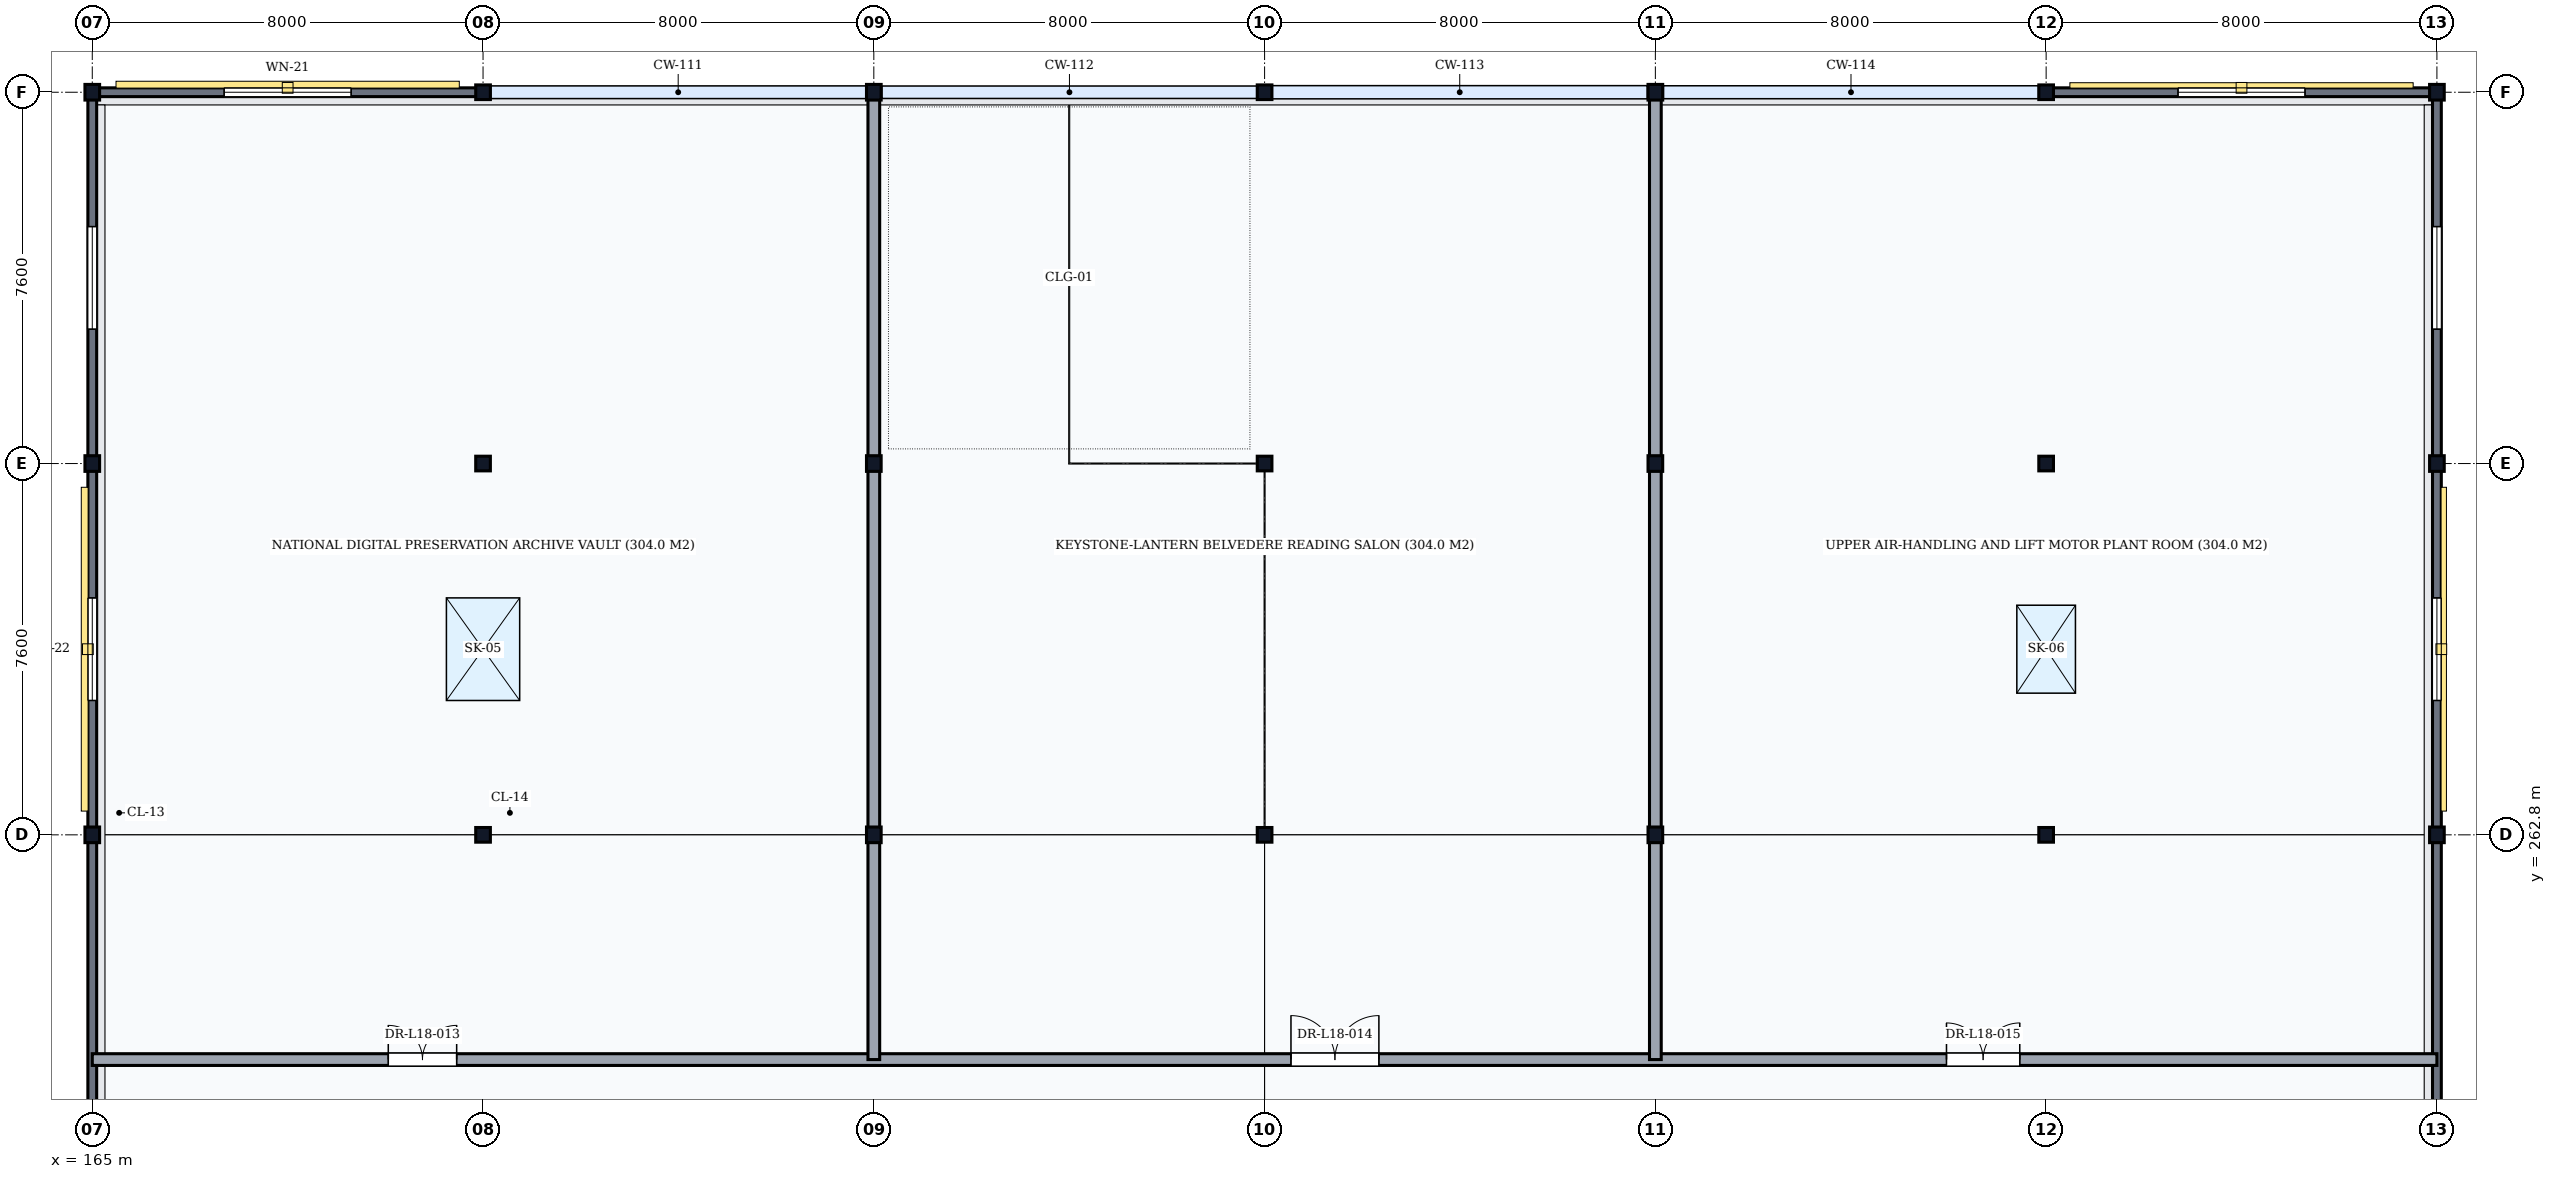
"""IFC4 building model, lengths in metres.
Left out: names, types, materials, properties, quantities, classifications, styles, units other than length and angle.
Written with IfcOpenShell. Run it as: python <this file> out.ifc"""

import sys

from ifc_helpers import new_model, si_unit, direction, frame, frame_2d, origin, origin_2d, place, context, subcontext, project, spatial, rectangle, i_section, extrude, element, fill, save


model = new_model("IFC4")
c1 = context("Model", 3, precision=1e-05, world=origin(), true_north=direction((0.0, 1.0)))
c2 = subcontext(c1, "Body", "Model", "MODEL_VIEW")
j1 = project(units=[si_unit("LENGTHUNIT", "METRE"), si_unit("PLANEANGLEUNIT", "RADIAN")], contexts=[c1])
p1 = place(None, origin())
s1 = spatial("IfcSite", under=j1, at=p1, CompositionType="ELEMENT")
p2 = place(p1, origin())
s2 = spatial("IfcBuilding", under=s1, at=p2, CompositionType="ELEMENT")
p3 = place(p2, frame((0.0, 0.0, 72.3)))
s3 = spatial("IfcBuildingStorey", under=s2, at=p3, CompositionType="ELEMENT", Elevation=72.3)
for number, where, z_axis, x_axis in (
    (1, (165.0, 262.8, 0.0), (0.0, 0.0, 1.0), (1.0, 0.0, 0.0)),
    (2, (165.0, 270.4, 0.0), (0.0, 0.0, 1.0), (1.0, 0.0, 0.0)),
    (3, (165.0, 278.0, 0.0), (0.0, 0.0, 1.0), (1.0, 0.0, 0.0)),
):
    element("IfcColumn", number, at=place(p3, frame(where, z_axis=z_axis, x_axis=x_axis)), inside=s3, PredefinedType="COLUMN", context=c2, shape_type="SweptSolid", body=[
        extrude(i_section(OverallWidth=0.3, OverallDepth=0.32, WebThickness=0.011, FlangeThickness=0.021, FilletRadius=0.027, at=origin_2d()), origin(), (0.0, 0.0, 1.0), 5.4),
    ])
for number, where, z_axis, x_axis in (
    (4, (173.0, 262.8, 0.0), (0.0, 0.0, 1.0), (1.0, 0.0, 0.0)),
    (5, (173.0, 270.4, 0.0), (0.0, 0.0, 1.0), (1.0, 0.0, 0.0)),
    (6, (173.0, 278.0, 0.0), (0.0, 0.0, 1.0), (1.0, 0.0, 0.0)),
):
    element("IfcColumn", number, at=place(p3, frame(where, z_axis=z_axis, x_axis=x_axis)), inside=s3, PredefinedType="COLUMN", context=c2, shape_type="SweptSolid", body=[
        extrude(i_section(OverallWidth=0.3, OverallDepth=0.3, WebThickness=0.011, FlangeThickness=0.019, FilletRadius=0.027, at=origin_2d()), origin(), (0.0, 0.0, 1.0), 5.4),
    ])
for number, where, z_axis, x_axis in (
    (7, (181.0, 262.8, 0.0), (0.0, 0.0, 1.0), (1.0, 0.0, 0.0)),
    (8, (181.0, 270.4, 0.0), (0.0, 0.0, 1.0), (1.0, 0.0, 0.0)),
    (9, (181.0, 278.0, 0.0), (0.0, 0.0, 1.0), (1.0, 0.0, 0.0)),
):
    element("IfcColumn", number, at=place(p3, frame(where, z_axis=z_axis, x_axis=x_axis)), inside=s3, PredefinedType="COLUMN", context=c2, shape_type="SweptSolid", body=[
        extrude(i_section(OverallWidth=0.3, OverallDepth=0.32, WebThickness=0.011, FlangeThickness=0.021, FilletRadius=0.027, at=origin_2d()), origin(), (0.0, 0.0, 1.0), 5.4),
    ])
for number, where, z_axis, x_axis in (
    (10, (189.0, 262.8, 0.0), (0.0, 0.0, 1.0), (1.0, 0.0, 0.0)),
    (11, (189.0, 270.4, 0.0), (0.0, 0.0, 1.0), (1.0, 0.0, 0.0)),
    (12, (189.0, 278.0, 0.0), (0.0, 0.0, 1.0), (1.0, 0.0, 0.0)),
):
    element("IfcColumn", number, at=place(p3, frame(where, z_axis=z_axis, x_axis=x_axis)), inside=s3, PredefinedType="COLUMN", context=c2, shape_type="SweptSolid", body=[
        extrude(i_section(OverallWidth=0.3, OverallDepth=0.3, WebThickness=0.011, FlangeThickness=0.019, FilletRadius=0.027, at=origin_2d()), origin(), (0.0, 0.0, 1.0), 5.4),
    ])
for number, where, z_axis, x_axis in (
    (13, (197.0, 262.8, 0.0), (0.0, 0.0, 1.0), (1.0, 0.0, 0.0)),
    (14, (197.0, 270.4, 0.0), (0.0, 0.0, 1.0), (1.0, 0.0, 0.0)),
    (15, (197.0, 278.0, 0.0), (0.0, 0.0, 1.0), (1.0, 0.0, 0.0)),
):
    element("IfcColumn", number, at=place(p3, frame(where, z_axis=z_axis, x_axis=x_axis)), inside=s3, PredefinedType="COLUMN", context=c2, shape_type="SweptSolid", body=[
        extrude(i_section(OverallWidth=0.3, OverallDepth=0.32, WebThickness=0.011, FlangeThickness=0.021, FilletRadius=0.027, at=origin_2d()), origin(), (0.0, 0.0, 1.0), 5.4),
    ])
for number, where, z_axis, x_axis in (
    (16, (205.0, 262.8, 0.0), (0.0, 0.0, 1.0), (1.0, 0.0, 0.0)),
    (17, (205.0, 270.4, 0.0), (0.0, 0.0, 1.0), (1.0, 0.0, 0.0)),
    (18, (205.0, 278.0, 0.0), (0.0, 0.0, 1.0), (1.0, 0.0, 0.0)),
):
    element("IfcColumn", number, at=place(p3, frame(where, z_axis=z_axis, x_axis=x_axis)), inside=s3, PredefinedType="COLUMN", context=c2, shape_type="SweptSolid", body=[
        extrude(i_section(OverallWidth=0.3, OverallDepth=0.3, WebThickness=0.011, FlangeThickness=0.019, FilletRadius=0.027, at=origin_2d()), origin(), (0.0, 0.0, 1.0), 5.4),
    ])
for number, where, z_axis, x_axis in (
    (19, (213.0, 262.8, 0.0), (0.0, 0.0, 1.0), (1.0, 0.0, 0.0)),
    (20, (213.0, 270.4, 0.0), (0.0, 0.0, 1.0), (1.0, 0.0, 0.0)),
    (21, (213.0, 278.0, 0.0), (0.0, 0.0, 1.0), (1.0, 0.0, 0.0)),
):
    element("IfcColumn", number, at=place(p3, frame(where, z_axis=z_axis, x_axis=x_axis)), inside=s3, PredefinedType="COLUMN", context=c2, shape_type="SweptSolid", body=[
        extrude(i_section(OverallWidth=0.3, OverallDepth=0.32, WebThickness=0.011, FlangeThickness=0.021, FilletRadius=0.027, at=origin_2d()), origin(), (0.0, 0.0, 1.0), 5.4),
    ])
p4 = place(p3, frame((165.006, 278.0, 0.0), z_axis=(0.0, 0.0, 1.0), x_axis=(1.0, 0.0, 0.0)))
e22 = element("IfcWall", 22, at=p4, inside=s3, PredefinedType="SOLIDWALL", context=c2, shape_type="SweptSolid", body=[
    extrude(rectangle(XDim=7.988, YDim=0.18, at=frame_2d((3.994, 0.0))), origin(), (0.0, 0.0, 1.0), 4.838),
])
p5 = place(p4, frame((2.694, 0.0, 0.95)))
e23 = element("IfcOpeningElement", 23, at=p5, cuts=e22, PredefinedType="OPENING", context=c2, shape_type="SweptSolid", body=[
    extrude(rectangle(XDim=2.6, YDim=2.4, at=frame_2d((1.3, 1.2))), frame((0.0, 0.105, 0.0), z_axis=(0.0, -1.0, 0.0), x_axis=(1.0, 0.0, 0.0)), (0.0, 0.0, 1.0), 0.21),
])
p6 = place(p3, frame((205.006, 278.0, 0.0), z_axis=(0.0, 0.0, 1.0), x_axis=(1.0, 0.0, 0.0)))
e24 = element("IfcWall", 24, at=p6, inside=s3, PredefinedType="SOLIDWALL", context=c2, shape_type="SweptSolid", body=[
    extrude(rectangle(XDim=7.988, YDim=0.18, at=frame_2d((3.994, 0.0))), origin(), (0.0, 0.0, 1.0), 4.838),
])
p7 = place(p6, frame((2.694, 0.0, 0.95)))
e25 = element("IfcOpeningElement", 25, at=p7, cuts=e24, PredefinedType="OPENING", context=c2, shape_type="SweptSolid", body=[
    extrude(rectangle(XDim=2.6, YDim=2.4, at=frame_2d((1.3, 1.2))), frame((0.0, 0.105, 0.0), z_axis=(0.0, -1.0, 0.0), x_axis=(1.0, 0.0, 0.0)), (0.0, 0.0, 1.0), 0.21),
])
p8 = place(p3, frame((165.0, 255.206, 0.0), z_axis=(0.0, 0.0, 1.0), x_axis=(0.0, 1.0, 0.0)))
e26 = element("IfcWall", 26, at=p8, inside=s3, PredefinedType="SOLIDWALL", context=c2, shape_type="SweptSolid", body=[
    extrude(rectangle(XDim=7.588, YDim=0.18, at=frame_2d((3.794, 0.0))), origin(), (0.0, 0.0, 1.0), 4.878),
])
p9 = place(p3, frame((165.0, 262.806, 0.0), z_axis=(0.0, 0.0, 1.0), x_axis=(0.0, 1.0, 0.0)))
e27 = element("IfcWall", 27, at=p9, inside=s3, PredefinedType="SOLIDWALL", context=c2, shape_type="SweptSolid", body=[
    extrude(rectangle(XDim=7.588, YDim=0.18, at=frame_2d((3.794, 0.0))), origin(), (0.0, 0.0, 1.0), 4.878),
])
p10 = place(p9, frame((2.744, 0.0, 0.95)))
e28 = element("IfcOpeningElement", 28, at=p10, cuts=e27, PredefinedType="OPENING", context=c2, shape_type="SweptSolid", body=[
    extrude(rectangle(XDim=2.1, YDim=2.3, at=frame_2d((1.05, 1.15))), frame((0.0, 0.105, 0.0), z_axis=(0.0, -1.0, 0.0), x_axis=(1.0, 0.0, 0.0)), (0.0, 0.0, 1.0), 0.21),
])
p11 = place(p3, frame((165.0, 270.406, 0.0), z_axis=(0.0, 0.0, 1.0), x_axis=(0.0, 1.0, 0.0)))
e29 = element("IfcWall", 29, at=p11, inside=s3, PredefinedType="SOLIDWALL", context=c2, shape_type="SweptSolid", body=[
    extrude(rectangle(XDim=7.588, YDim=0.18, at=frame_2d((3.794, 0.0))), origin(), (0.0, 0.0, 1.0), 4.878),
])
p12 = place(p11, frame((2.744, 0.0, 0.95)))
e30 = element("IfcOpeningElement", 30, at=p12, cuts=e29, PredefinedType="OPENING", context=c2, shape_type="SweptSolid", body=[
    extrude(rectangle(XDim=2.1, YDim=2.3, at=frame_2d((1.05, 1.15))), frame((0.0, 0.105, 0.0), z_axis=(0.0, -1.0, 0.0), x_axis=(1.0, 0.0, 0.0)), (0.0, 0.0, 1.0), 0.21),
])
p13 = place(p3, frame((213.0, 255.206, 0.0), z_axis=(0.0, 0.0, 1.0), x_axis=(0.0, 1.0, 0.0)))
e31 = element("IfcWall", 31, at=p13, inside=s3, PredefinedType="SOLIDWALL", context=c2, shape_type="SweptSolid", body=[
    extrude(rectangle(XDim=7.588, YDim=0.18, at=frame_2d((3.794, 0.0))), origin(), (0.0, 0.0, 1.0), 4.878),
])
p14 = place(p3, frame((213.0, 262.806, 0.0), z_axis=(0.0, 0.0, 1.0), x_axis=(0.0, 1.0, 0.0)))
e32 = element("IfcWall", 32, at=p14, inside=s3, PredefinedType="SOLIDWALL", context=c2, shape_type="SweptSolid", body=[
    extrude(rectangle(XDim=7.588, YDim=0.18, at=frame_2d((3.794, 0.0))), origin(), (0.0, 0.0, 1.0), 4.878),
])
p15 = place(p14, frame((2.744, 0.0, 0.95)))
e33 = element("IfcOpeningElement", 33, at=p15, cuts=e32, PredefinedType="OPENING", context=c2, shape_type="SweptSolid", body=[
    extrude(rectangle(XDim=2.1, YDim=2.3, at=frame_2d((1.05, 1.15))), frame((0.0, 0.105, 0.0), z_axis=(0.0, -1.0, 0.0), x_axis=(1.0, 0.0, 0.0)), (0.0, 0.0, 1.0), 0.21),
])
p16 = place(p3, frame((213.0, 270.406, 0.0), z_axis=(0.0, 0.0, 1.0), x_axis=(0.0, 1.0, 0.0)))
e34 = element("IfcWall", 34, at=p16, inside=s3, PredefinedType="SOLIDWALL", context=c2, shape_type="SweptSolid", body=[
    extrude(rectangle(XDim=7.588, YDim=0.18, at=frame_2d((3.794, 0.0))), origin(), (0.0, 0.0, 1.0), 4.878),
])
p17 = place(p16, frame((2.744, 0.0, 0.95)))
e35 = element("IfcOpeningElement", 35, at=p17, cuts=e34, PredefinedType="OPENING", context=c2, shape_type="SweptSolid", body=[
    extrude(rectangle(XDim=2.1, YDim=2.3, at=frame_2d((1.05, 1.15))), frame((0.0, 0.105, 0.0), z_axis=(0.0, -1.0, 0.0), x_axis=(1.0, 0.0, 0.0)), (0.0, 0.0, 1.0), 0.21),
])
p18 = place(p3, frame((165.0, 277.87, 5.4), z_axis=(0.0, 0.0, 1.0), x_axis=(1.0, 0.0, 0.0)))
e36 = element("IfcWall", 36, at=p18, inside=s3, PredefinedType="PARAPET", context=c2, shape_type="SweptSolid", body=[
    extrude(rectangle(XDim=48.0, YDim=0.26, at=frame_2d((24.0, 0.0))), origin(), (0.0, 0.0, 1.0), 1.5),
])
p19 = place(p3, frame((165.13, 253.12, 5.4), z_axis=(0.0, 0.0, 1.0), x_axis=(0.0, 1.0, 0.0)))
e37 = element("IfcWall", 37, at=p19, inside=s3, PredefinedType="PARAPET", context=c2, shape_type="SweptSolid", body=[
    extrude(rectangle(XDim=24.62, YDim=0.26, at=frame_2d((12.31, 0.0))), origin(), (0.0, 0.0, 1.0), 1.5),
])
p20 = place(p3, frame((212.87, 248.66, 5.4), z_axis=(0.0, 0.0, 1.0), x_axis=(0.0, 1.0, 0.0)))
e38 = element("IfcWall", 38, at=p20, inside=s3, PredefinedType="PARAPET", context=c2, shape_type="SweptSolid", body=[
    extrude(rectangle(XDim=29.08, YDim=0.26, at=frame_2d((14.54, 0.0))), origin(), (0.0, 0.0, 1.0), 1.5),
])
p21 = place(p3, frame((165.0, 258.2, 0.0), z_axis=(0.0, 0.0, 1.0), x_axis=(1.0, 0.0, 0.0)))
e39 = element("IfcWall", 39, at=p21, inside=s3, PredefinedType="PARTITIONING", context=c2, shape_type="SweptSolid", body=[
    extrude(rectangle(XDim=48.0, YDim=0.24, at=frame_2d((24.0, 0.0))), origin(), (0.0, 0.0, 1.0), 5.15),
])
p22 = place(p21, frame((6.06, 0.0, 0.0)))
e40 = element("IfcOpeningElement", 40, at=p22, cuts=e39, PredefinedType="OPENING", context=c2, shape_type="SweptSolid", body=[
    extrude(rectangle(XDim=1.4, YDim=2.1, at=frame_2d((0.7, 1.05))), frame((0.0, 0.135, 0.0), z_axis=(0.0, -1.0, 0.0), x_axis=(1.0, 0.0, 0.0)), (0.0, 0.0, 1.0), 0.27),
])
p23 = place(p21, frame((24.54, 0.0, 0.0)))
e41 = element("IfcOpeningElement", 41, at=p23, cuts=e39, PredefinedType="OPENING", context=c2, shape_type="SweptSolid", body=[
    extrude(rectangle(XDim=1.8, YDim=2.4, at=frame_2d((0.9, 1.2))), frame((0.0, 0.135, 0.0), z_axis=(0.0, -1.0, 0.0), x_axis=(1.0, 0.0, 0.0)), (0.0, 0.0, 1.0), 0.27),
])
p24 = place(p21, frame((37.96, 0.0, 0.0)))
e42 = element("IfcOpeningElement", 42, at=p24, cuts=e39, PredefinedType="OPENING", context=c2, shape_type="SweptSolid", body=[
    extrude(rectangle(XDim=1.5, YDim=2.1, at=frame_2d((0.75, 1.05))), frame((0.0, 0.135, 0.0), z_axis=(0.0, -1.0, 0.0), x_axis=(1.0, 0.0, 0.0)), (0.0, 0.0, 1.0), 0.27),
])
for number, where, z_axis, x_axis in (
    (43, (181.0, 258.2, 0.0), (0.0, 0.0, 1.0), (0.0, 1.0, 0.0)),
    (44, (197.0, 258.2, 0.0), (0.0, 0.0, 1.0), (0.0, 1.0, 0.0)),
):
    element("IfcWall", number, at=place(p3, frame(where, z_axis=z_axis, x_axis=x_axis)), inside=s3, PredefinedType="PARTITIONING", context=c2, shape_type="SweptSolid", body=[
        extrude(rectangle(XDim=19.8, YDim=0.24, at=frame_2d((9.9, 0.0))), origin(), (0.0, 0.0, 1.0), 4.748),
    ])
p25 = place(p5, origin())
e45 = element("IfcWindow", 45, at=p25, inside=s3, PartitioningType="TRIPLE_PANEL_VERTICAL", PredefinedType="WINDOW", context=c2, shape_type="SweptSolid", body=[
    extrude(rectangle(XDim=2.6, YDim=2.4, at=frame_2d((1.3, 1.2))), frame((0.0, 0.03, 0.0), z_axis=(0.0, -1.0, 0.0), x_axis=(1.0, 0.0, 0.0)), (0.0, 0.0, 1.0), 0.06),
])
fill(e23, e45)
p26 = place(p7, origin())
e46 = element("IfcWindow", 46, at=p26, inside=s3, PartitioningType="TRIPLE_PANEL_VERTICAL", PredefinedType="WINDOW", context=c2, shape_type="SweptSolid", body=[
    extrude(rectangle(XDim=2.6, YDim=2.4, at=frame_2d((1.3, 1.2))), frame((0.0, 0.03, 0.0), z_axis=(0.0, -1.0, 0.0), x_axis=(1.0, 0.0, 0.0)), (0.0, 0.0, 1.0), 0.06),
])
fill(e25, e46)
p27 = place(p10, origin())
e47 = element("IfcWindow", 47, at=p27, inside=s3, PartitioningType="DOUBLE_PANEL_VERTICAL", PredefinedType="WINDOW", context=c2, shape_type="SweptSolid", body=[
    extrude(rectangle(XDim=2.1, YDim=2.3, at=frame_2d((1.05, 1.15))), frame((0.0, 0.03, 0.0), z_axis=(0.0, -1.0, 0.0), x_axis=(1.0, 0.0, 0.0)), (0.0, 0.0, 1.0), 0.06),
])
fill(e28, e47)
p28 = place(p12, origin())
e48 = element("IfcWindow", 48, at=p28, inside=s3, PartitioningType="DOUBLE_PANEL_VERTICAL", PredefinedType="WINDOW", context=c2, shape_type="SweptSolid", body=[
    extrude(rectangle(XDim=2.1, YDim=2.3, at=frame_2d((1.05, 1.15))), frame((0.0, 0.03, 0.0), z_axis=(0.0, -1.0, 0.0), x_axis=(1.0, 0.0, 0.0)), (0.0, 0.0, 1.0), 0.06),
])
fill(e30, e48)
p29 = place(p15, origin())
e49 = element("IfcWindow", 49, at=p29, inside=s3, PartitioningType="DOUBLE_PANEL_VERTICAL", PredefinedType="WINDOW", context=c2, shape_type="SweptSolid", body=[
    extrude(rectangle(XDim=2.1, YDim=2.3, at=frame_2d((1.05, 1.15))), frame((0.0, 0.03, 0.0), z_axis=(0.0, -1.0, 0.0), x_axis=(1.0, 0.0, 0.0)), (0.0, 0.0, 1.0), 0.06),
])
fill(e33, e49)
p30 = place(p17, origin())
e50 = element("IfcWindow", 50, at=p30, inside=s3, PartitioningType="DOUBLE_PANEL_VERTICAL", PredefinedType="WINDOW", context=c2, shape_type="SweptSolid", body=[
    extrude(rectangle(XDim=2.1, YDim=2.3, at=frame_2d((1.05, 1.15))), frame((0.0, 0.03, 0.0), z_axis=(0.0, -1.0, 0.0), x_axis=(1.0, 0.0, 0.0)), (0.0, 0.0, 1.0), 0.06),
])
fill(e35, e50)
p31 = place(p2, frame((0.0, 0.0, 77.7)))
p32 = place(p31, frame((0.0, 0.0, -0.25)))
p33 = place(p32, frame((173.0, 266.6, -0.01)))
p34 = place(p33, frame((0.0, 0.0, 0.21)))
e51 = element("IfcWindow", 51, at=p34, inside=s3, PartitioningType="SINGLE_PANEL", PredefinedType="SKYLIGHT", context=c2, shape_type="SweptSolid", body=[
    extrude(rectangle(XDim=1.5, YDim=2.1, at=origin_2d()), origin(), (0.0, 0.0, 1.0), 0.05),
])
p35 = place(p32, frame((205.0, 266.6, -0.01)))
p36 = place(p35, frame((0.0, 0.0, 0.21)))
e52 = element("IfcWindow", 52, at=p36, inside=s3, PartitioningType="SINGLE_PANEL", PredefinedType="SKYLIGHT", context=c2, shape_type="SweptSolid", body=[
    extrude(rectangle(XDim=1.2, YDim=1.8, at=origin_2d()), origin(), (0.0, 0.0, 1.0), 0.05),
])
p37 = place(p22, origin())
e53 = element("IfcDoor", 53, at=p37, inside=s3, OperationType="DOUBLE_DOOR_SINGLE_SWING", PredefinedType="DOOR", context=c2, shape_type="SweptSolid", body=[
    extrude(rectangle(XDim=1.4, YDim=2.1, at=frame_2d((0.7, 1.05))), frame((0.0, 0.025, 0.0), z_axis=(0.0, -1.0, 0.0), x_axis=(1.0, 0.0, 0.0)), (0.0, 0.0, 1.0), 0.05),
])
fill(e40, e53)
p38 = place(p23, origin())
e54 = element("IfcDoor", 54, at=p38, inside=s3, OperationType="DOUBLE_DOOR_SINGLE_SWING", PredefinedType="DOOR", context=c2, shape_type="SweptSolid", body=[
    extrude(rectangle(XDim=1.8, YDim=2.4, at=frame_2d((0.9, 1.2))), frame((0.0, 0.025, 0.0), z_axis=(0.0, -1.0, 0.0), x_axis=(1.0, 0.0, 0.0)), (0.0, 0.0, 1.0), 0.05),
])
fill(e41, e54)
p39 = place(p24, origin())
e55 = element("IfcDoor", 55, at=p39, inside=s3, OperationType="DOUBLE_DOOR_SINGLE_SWING", PredefinedType="DOOR", context=c2, shape_type="SweptSolid", body=[
    extrude(rectangle(XDim=1.5, YDim=2.1, at=frame_2d((0.75, 1.05))), frame((0.0, 0.025, 0.0), z_axis=(0.0, -1.0, 0.0), x_axis=(1.0, 0.0, 0.0)), (0.0, 0.0, 1.0), 0.05),
])
fill(e42, e55)
save(model, sys.argv[1])
